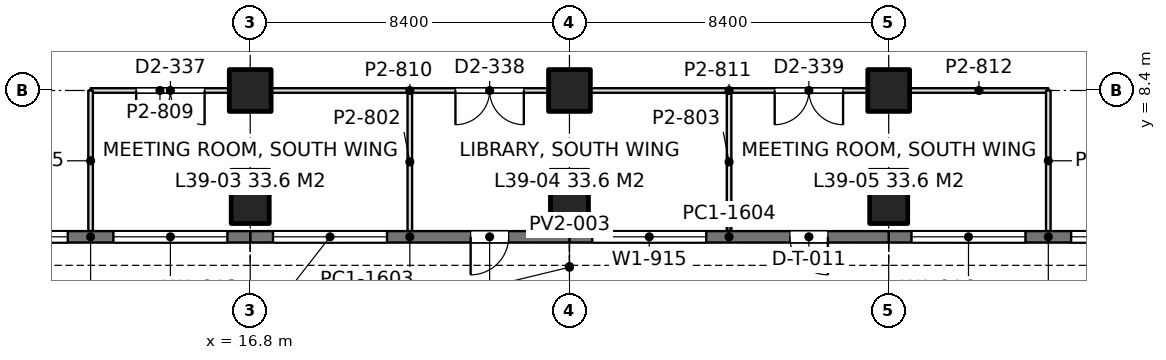
"""IFC4 building model, lengths in metres.
Left out: names, types, materials, properties, quantities, classifications, styles, units other than length and angle.
Written with IfcOpenShell. Run it as: python <this file> out.ifc"""

import sys

from ifc_helpers import new_model, si_unit, direction, frame, frame_2d, origin, origin_2d, place, context, subcontext, project, spatial, rectangle, extrude, element, fill, save


model = new_model("IFC4")
c1 = context("Model", 3, precision=1e-05, world=origin(), true_north=direction((0.0, 1.0)))
c2 = subcontext(c1, "Body", "Model", "MODEL_VIEW")
j1 = project(units=[si_unit("LENGTHUNIT", "METRE"), si_unit("PLANEANGLEUNIT", "RADIAN")], contexts=[c1])
p1 = place(None, origin())
s1 = spatial("IfcSite", under=j1, at=p1, CompositionType="ELEMENT")
p2 = place(p1, origin())
s2 = spatial("IfcBuilding", under=s1, at=p2, CompositionType="ELEMENT")
p3 = place(p2, frame((0.0, 0.0, 173.4)))
s3 = spatial("IfcBuildingStorey", under=s2, at=p3, CompositionType="ELEMENT", Elevation=173.4)
p4 = place(p3, frame((16.8, 5.6, -0.36), z_axis=(0.0, 0.0, 1.0), x_axis=(1.0, 0.0, 0.0)))
e1 = element("IfcColumn", 1, at=p4, inside=s3, PredefinedType="COLUMN", context=c2, shape_type="SweptSolid", body=[
    extrude(rectangle(XDim=1.0, YDim=1.4, at=origin_2d()), origin(), (0.0, 0.0, 1.0), 4.56),
])
p5 = place(p3, frame((16.8, 8.4, 0.0), z_axis=(0.0, 0.0, 1.0), x_axis=(1.0, 0.0, 0.0)))
e2 = element("IfcColumn", 2, at=p5, inside=s3, PredefinedType="COLUMN", context=c2, shape_type="SweptSolid", body=[
    extrude(rectangle(XDim=1.1, YDim=1.1, at=origin_2d()), origin(), (0.0, 0.0, 1.0), 4.2),
])
p6 = place(p3, frame((25.2, 5.6, -0.36), z_axis=(0.0, 0.0, 1.0), x_axis=(1.0, 0.0, 0.0)))
e3 = element("IfcColumn", 3, at=p6, inside=s3, PredefinedType="COLUMN", context=c2, shape_type="SweptSolid", body=[
    extrude(rectangle(XDim=1.0, YDim=1.4, at=origin_2d()), origin(), (0.0, 0.0, 1.0), 4.56),
])
p7 = place(p3, frame((25.2, 8.4, 0.0), z_axis=(0.0, 0.0, 1.0), x_axis=(1.0, 0.0, 0.0)))
e4 = element("IfcColumn", 4, at=p7, inside=s3, PredefinedType="COLUMN", context=c2, shape_type="SweptSolid", body=[
    extrude(rectangle(XDim=1.1, YDim=1.1, at=origin_2d()), origin(), (0.0, 0.0, 1.0), 4.2),
])
p8 = place(p3, frame((33.6, 5.6, -0.36), z_axis=(0.0, 0.0, 1.0), x_axis=(1.0, 0.0, 0.0)))
e5 = element("IfcColumn", 5, at=p8, inside=s3, PredefinedType="COLUMN", context=c2, shape_type="SweptSolid", body=[
    extrude(rectangle(XDim=1.0, YDim=1.4, at=origin_2d()), origin(), (0.0, 0.0, 1.0), 4.56),
])
p9 = place(p3, frame((33.6, 8.4, 0.0), z_axis=(0.0, 0.0, 1.0), x_axis=(1.0, 0.0, 0.0)))
e6 = element("IfcColumn", 6, at=p9, inside=s3, PredefinedType="COLUMN", context=c2, shape_type="SweptSolid", body=[
    extrude(rectangle(XDim=1.1, YDim=1.1, at=origin_2d()), origin(), (0.0, 0.0, 1.0), 4.2),
])
p10 = place(p3, frame((42.0, 4.55, 0.0), z_axis=(0.0, 0.0, 1.0), x_axis=(-1.0, 0.0, 0.0)))
e7 = element("IfcWall", 7, at=p10, inside=s3, PredefinedType="SOLIDWALL", context=c2, shape_type="SweptSolid", body=[
    extrude(rectangle(XDim=8.4, YDim=0.3, at=frame_2d((4.2, 0.0))), origin(), (0.0, 0.0, 1.0), 4.05),
])
p11 = place(p10, frame((0.6, 0.0, 0.9)))
e8 = element("IfcOpeningElement", 8, at=p11, cuts=e7, PredefinedType="OPENING", context=c2, shape_type="SweptSolid", body=[
    extrude(rectangle(XDim=3.0, YDim=1.9, at=frame_2d((1.5, 0.95))), frame((0.0, 0.16, 0.0), z_axis=(0.0, -1.0, 0.0), x_axis=(1.0, 0.0, 0.0)), (0.0, 0.0, 1.0), 0.32),
])
p12 = place(p10, frame((4.8, 0.0, 0.9)))
e9 = element("IfcOpeningElement", 9, at=p12, cuts=e7, PredefinedType="OPENING", context=c2, shape_type="SweptSolid", body=[
    extrude(rectangle(XDim=3.0, YDim=1.9, at=frame_2d((1.5, 0.95))), frame((0.0, 0.16, 0.0), z_axis=(0.0, -1.0, 0.0), x_axis=(1.0, 0.0, 0.0)), (0.0, 0.0, 1.0), 0.32),
])
p13 = place(p3, frame((33.6, 4.55, 0.0), z_axis=(0.0, 0.0, 1.0), x_axis=(-1.0, 0.0, 0.0)))
e10 = element("IfcWall", 10, at=p13, inside=s3, PredefinedType="SOLIDWALL", context=c2, shape_type="SweptSolid", body=[
    extrude(rectangle(XDim=8.4, YDim=0.3, at=frame_2d((4.2, 0.0))), origin(), (0.0, 0.0, 1.0), 4.05),
])
p14 = place(p13, frame((4.8, 0.0, 0.9)))
e11 = element("IfcOpeningElement", 11, at=p14, cuts=e10, PredefinedType="OPENING", context=c2, shape_type="SweptSolid", body=[
    extrude(rectangle(XDim=3.0, YDim=1.9, at=frame_2d((1.5, 0.95))), frame((0.0, 0.16, 0.0), z_axis=(0.0, -1.0, 0.0), x_axis=(1.0, 0.0, 0.0)), (0.0, 0.0, 1.0), 0.32),
])
p15 = place(p13, frame((1.6, 0.0, 0.0)))
e12 = element("IfcOpeningElement", 12, at=p15, cuts=e10, PredefinedType="OPENING", context=c2, shape_type="SweptSolid", body=[
    extrude(rectangle(XDim=1.0, YDim=2.4, at=frame_2d((0.5, 1.2))), frame((0.0, 0.16, 0.0), z_axis=(0.0, -1.0, 0.0), x_axis=(1.0, 0.0, 0.0)), (0.0, 0.0, 1.0), 0.32),
])
p16 = place(p3, frame((25.2, 4.55, 0.0), z_axis=(0.0, 0.0, 1.0), x_axis=(-1.0, 0.0, 0.0)))
e13 = element("IfcWall", 13, at=p16, inside=s3, PredefinedType="SOLIDWALL", context=c2, shape_type="SweptSolid", body=[
    extrude(rectangle(XDim=8.4, YDim=0.3, at=frame_2d((4.2, 0.0))), origin(), (0.0, 0.0, 1.0), 4.05),
])
p17 = place(p16, frame((4.8, 0.0, 0.9)))
e14 = element("IfcOpeningElement", 14, at=p17, cuts=e13, PredefinedType="OPENING", context=c2, shape_type="SweptSolid", body=[
    extrude(rectangle(XDim=3.0, YDim=1.9, at=frame_2d((1.5, 0.95))), frame((0.0, 0.16, 0.0), z_axis=(0.0, -1.0, 0.0), x_axis=(1.0, 0.0, 0.0)), (0.0, 0.0, 1.0), 0.32),
])
p18 = place(p16, frame((1.6, 0.0, 0.0)))
e15 = element("IfcOpeningElement", 15, at=p18, cuts=e13, PredefinedType="OPENING", context=c2, shape_type="SweptSolid", body=[
    extrude(rectangle(XDim=1.0, YDim=2.4, at=frame_2d((0.5, 1.2))), frame((0.0, 0.16, 0.0), z_axis=(0.0, -1.0, 0.0), x_axis=(1.0, 0.0, 0.0)), (0.0, 0.0, 1.0), 0.32),
])
p19 = place(p3, frame((16.8, 4.55, 0.0), z_axis=(0.0, 0.0, 1.0), x_axis=(-1.0, 0.0, 0.0)))
e16 = element("IfcWall", 16, at=p19, inside=s3, PredefinedType="SOLIDWALL", context=c2, shape_type="SweptSolid", body=[
    extrude(rectangle(XDim=8.4, YDim=0.3, at=frame_2d((4.2, 0.0))), origin(), (0.0, 0.0, 1.0), 4.05),
])
p20 = place(p19, frame((0.6, 0.0, 0.9)))
e17 = element("IfcOpeningElement", 17, at=p20, cuts=e16, PredefinedType="OPENING", context=c2, shape_type="SweptSolid", body=[
    extrude(rectangle(XDim=3.0, YDim=1.9, at=frame_2d((1.5, 0.95))), frame((0.0, 0.16, 0.0), z_axis=(0.0, -1.0, 0.0), x_axis=(1.0, 0.0, 0.0)), (0.0, 0.0, 1.0), 0.32),
])
p21 = place(p19, frame((4.8, 0.0, 0.9)))
e18 = element("IfcOpeningElement", 18, at=p21, cuts=e16, PredefinedType="OPENING", context=c2, shape_type="SweptSolid", body=[
    extrude(rectangle(XDim=3.0, YDim=1.9, at=frame_2d((1.5, 0.95))), frame((0.0, 0.16, 0.0), z_axis=(0.0, -1.0, 0.0), x_axis=(1.0, 0.0, 0.0)), (0.0, 0.0, 1.0), 0.32),
])
p22 = place(p3, frame((12.6, 8.4, 0.0), z_axis=(0.0, 0.0, 1.0), x_axis=(1.0, 0.0, 0.0)))
e19 = element("IfcWall", 19, at=p22, inside=s3, PredefinedType="PARTITIONING", context=c2, shape_type="SweptSolid", body=[
    extrude(rectangle(XDim=3.651, YDim=0.12, at=frame_2d((1.825, 0.0))), origin(), (0.0, 0.0, 1.0), 3.55),
])
p23 = place(p22, frame((1.2, 0.0, 0.0)))
e20 = element("IfcOpeningElement", 20, at=p23, cuts=e19, PredefinedType="OPENING", context=c2, shape_type="SweptSolid", body=[
    extrude(rectangle(XDim=1.8, YDim=2.2, at=frame_2d((0.9, 1.1))), frame((0.0, 0.07, 0.0), z_axis=(0.0, -1.0, 0.0), x_axis=(1.0, 0.0, 0.0)), (0.0, 0.0, 1.0), 0.14),
])
p24 = place(p3, frame((17.349, 8.4, 0.0), z_axis=(0.0, 0.0, 1.0), x_axis=(1.0, 0.0, 0.0)))
e21 = element("IfcWall", 21, at=p24, inside=s3, PredefinedType="PARTITIONING", context=c2, shape_type="SweptSolid", body=[
    extrude(rectangle(XDim=7.302, YDim=0.12, at=frame_2d((3.651, 0.0))), origin(), (0.0, 0.0, 1.0), 3.55),
])
p25 = place(p24, frame((4.851, 0.0, 0.0)))
e22 = element("IfcOpeningElement", 22, at=p25, cuts=e21, PredefinedType="OPENING", context=c2, shape_type="SweptSolid", body=[
    extrude(rectangle(XDim=1.8, YDim=2.2, at=frame_2d((0.9, 1.1))), frame((0.0, 0.07, 0.0), z_axis=(0.0, -1.0, 0.0), x_axis=(1.0, 0.0, 0.0)), (0.0, 0.0, 1.0), 0.14),
])
p26 = place(p3, frame((25.749, 8.4, 0.0), z_axis=(0.0, 0.0, 1.0), x_axis=(1.0, 0.0, 0.0)))
e23 = element("IfcWall", 23, at=p26, inside=s3, PredefinedType="PARTITIONING", context=c2, shape_type="SweptSolid", body=[
    extrude(rectangle(XDim=7.302, YDim=0.12, at=frame_2d((3.651, 0.0))), origin(), (0.0, 0.0, 1.0), 3.55),
])
p27 = place(p26, frame((4.851, 0.0, 0.0)))
e24 = element("IfcOpeningElement", 24, at=p27, cuts=e23, PredefinedType="OPENING", context=c2, shape_type="SweptSolid", body=[
    extrude(rectangle(XDim=1.8, YDim=2.2, at=frame_2d((0.9, 1.1))), frame((0.0, 0.07, 0.0), z_axis=(0.0, -1.0, 0.0), x_axis=(1.0, 0.0, 0.0)), (0.0, 0.0, 1.0), 0.14),
])
p28 = place(p3, frame((34.149, 8.4, 0.0), z_axis=(0.0, 0.0, 1.0), x_axis=(1.0, 0.0, 0.0)))
e25 = element("IfcWall", 25, at=p28, inside=s3, PredefinedType="PARTITIONING", context=c2, shape_type="SweptSolid", body=[
    extrude(rectangle(XDim=3.651, YDim=0.12, at=frame_2d((1.826, 0.0))), origin(), (0.0, 0.0, 1.0), 3.55),
])
p29 = place(p3, frame((12.6, 4.7, 0.0), z_axis=(0.0, 0.0, 1.0), x_axis=(0.0, 1.0, 0.0)))
e26 = element("IfcWall", 26, at=p29, inside=s3, PredefinedType="PARTITIONING", context=c2, shape_type="SweptSolid", body=[
    extrude(rectangle(XDim=3.7, YDim=0.12, at=frame_2d((1.85, 0.0))), origin(), (0.0, 0.0, 1.0), 3.55),
])
for number, where, z_axis, x_axis in (
    (27, (21.0, 4.7, 0.0), (0.0, 0.0, 1.0), (0.0, 1.0, 0.0)),
    (28, (29.4, 4.7, 0.0), (0.0, 0.0, 1.0), (0.0, 1.0, 0.0)),
):
    element("IfcWall", number, at=place(p3, frame(where, z_axis=z_axis, x_axis=x_axis)), inside=s3, PredefinedType="PARTITIONING", context=c2, shape_type="SweptSolid", body=[
        extrude(rectangle(XDim=3.642, YDim=0.12, at=frame_2d((1.821, 0.0))), origin(), (0.0, 0.0, 1.0), 3.55),
    ])
p30 = place(p3, frame((37.8, 4.7, 0.0), z_axis=(0.0, 0.0, 1.0), x_axis=(0.0, 1.0, 0.0)))
e29 = element("IfcWall", 29, at=p30, inside=s3, PredefinedType="PARTITIONING", context=c2, shape_type="SweptSolid", body=[
    extrude(rectangle(XDim=3.7, YDim=0.12, at=frame_2d((1.85, 0.0))), origin(), (0.0, 0.0, 1.0), 3.55),
])
p31 = place(p11, origin())
e30 = element("IfcWindow", 30, at=p31, inside=s3, PartitioningType="SINGLE_PANEL", PredefinedType="WINDOW", context=c2, shape_type="SweptSolid", body=[
    extrude(rectangle(XDim=3.0, YDim=1.9, at=frame_2d((1.5, 0.95))), frame((0.0, 0.03, 0.0), z_axis=(0.0, -1.0, 0.0), x_axis=(1.0, 0.0, 0.0)), (0.0, 0.0, 1.0), 0.06),
])
fill(e8, e30)
p32 = place(p12, origin())
e31 = element("IfcWindow", 31, at=p32, inside=s3, PartitioningType="SINGLE_PANEL", PredefinedType="WINDOW", context=c2, shape_type="SweptSolid", body=[
    extrude(rectangle(XDim=3.0, YDim=1.9, at=frame_2d((1.5, 0.95))), frame((0.0, 0.03, 0.0), z_axis=(0.0, -1.0, 0.0), x_axis=(1.0, 0.0, 0.0)), (0.0, 0.0, 1.0), 0.06),
])
fill(e9, e31)
p33 = place(p14, origin())
e32 = element("IfcWindow", 32, at=p33, inside=s3, PartitioningType="SINGLE_PANEL", PredefinedType="WINDOW", context=c2, shape_type="SweptSolid", body=[
    extrude(rectangle(XDim=3.0, YDim=1.9, at=frame_2d((1.5, 0.95))), frame((0.0, 0.03, 0.0), z_axis=(0.0, -1.0, 0.0), x_axis=(1.0, 0.0, 0.0)), (0.0, 0.0, 1.0), 0.06),
])
fill(e11, e32)
p34 = place(p15, origin())
e33 = element("IfcDoor", 33, at=p34, inside=s3, OperationType="SINGLE_SWING_LEFT", PredefinedType="DOOR", context=c2, shape_type="SweptSolid", body=[
    extrude(rectangle(XDim=1.0, YDim=2.4, at=frame_2d((0.5, 1.2))), frame((0.0, 0.025, 0.0), z_axis=(0.0, -1.0, 0.0), x_axis=(1.0, 0.0, 0.0)), (0.0, 0.0, 1.0), 0.05),
])
fill(e12, e33)
p35 = place(p17, origin())
e34 = element("IfcWindow", 34, at=p35, inside=s3, PartitioningType="SINGLE_PANEL", PredefinedType="WINDOW", context=c2, shape_type="SweptSolid", body=[
    extrude(rectangle(XDim=3.0, YDim=1.9, at=frame_2d((1.5, 0.95))), frame((0.0, 0.03, 0.0), z_axis=(0.0, -1.0, 0.0), x_axis=(1.0, 0.0, 0.0)), (0.0, 0.0, 1.0), 0.06),
])
fill(e14, e34)
p36 = place(p18, origin())
e35 = element("IfcDoor", 35, at=p36, inside=s3, OperationType="SINGLE_SWING_RIGHT", PredefinedType="DOOR", context=c2, shape_type="SweptSolid", body=[
    extrude(rectangle(XDim=1.0, YDim=2.4, at=frame_2d((0.5, 1.2))), frame((0.0, 0.025, 0.0), z_axis=(0.0, -1.0, 0.0), x_axis=(1.0, 0.0, 0.0)), (0.0, 0.0, 1.0), 0.05),
])
fill(e15, e35)
p37 = place(p20, origin())
e36 = element("IfcWindow", 36, at=p37, inside=s3, PartitioningType="SINGLE_PANEL", PredefinedType="WINDOW", context=c2, shape_type="SweptSolid", body=[
    extrude(rectangle(XDim=3.0, YDim=1.9, at=frame_2d((1.5, 0.95))), frame((0.0, 0.03, 0.0), z_axis=(0.0, -1.0, 0.0), x_axis=(1.0, 0.0, 0.0)), (0.0, 0.0, 1.0), 0.06),
])
fill(e17, e36)
p38 = place(p21, origin())
e37 = element("IfcWindow", 37, at=p38, inside=s3, PartitioningType="SINGLE_PANEL", PredefinedType="WINDOW", context=c2, shape_type="SweptSolid", body=[
    extrude(rectangle(XDim=3.0, YDim=1.9, at=frame_2d((1.5, 0.95))), frame((0.0, 0.03, 0.0), z_axis=(0.0, -1.0, 0.0), x_axis=(1.0, 0.0, 0.0)), (0.0, 0.0, 1.0), 0.06),
])
fill(e18, e37)
p39 = place(p23, frame((1.8, 0.0, 0.0), z_axis=(0.0, 0.0, 1.0), x_axis=(-1.0, 0.0, 0.0)))
e38 = element("IfcDoor", 38, at=p39, inside=s3, OperationType="DOUBLE_DOOR_SINGLE_SWING", PredefinedType="DOOR", context=c2, shape_type="SweptSolid", body=[
    extrude(rectangle(XDim=1.8, YDim=2.2, at=frame_2d((0.9, 1.1))), frame((0.0, 0.025, 0.0), z_axis=(0.0, -1.0, 0.0), x_axis=(1.0, 0.0, 0.0)), (0.0, 0.0, 1.0), 0.05),
])
fill(e20, e38)
p40 = place(p25, frame((1.8, 0.0, 0.0), z_axis=(0.0, 0.0, 1.0), x_axis=(-1.0, 0.0, 0.0)))
e39 = element("IfcDoor", 39, at=p40, inside=s3, OperationType="DOUBLE_DOOR_SINGLE_SWING", PredefinedType="DOOR", context=c2, shape_type="SweptSolid", body=[
    extrude(rectangle(XDim=1.8, YDim=2.2, at=frame_2d((0.9, 1.1))), frame((0.0, 0.025, 0.0), z_axis=(0.0, -1.0, 0.0), x_axis=(1.0, 0.0, 0.0)), (0.0, 0.0, 1.0), 0.05),
])
fill(e22, e39)
p41 = place(p27, frame((1.8, 0.0, 0.0), z_axis=(0.0, 0.0, 1.0), x_axis=(-1.0, 0.0, 0.0)))
e40 = element("IfcDoor", 40, at=p41, inside=s3, OperationType="DOUBLE_DOOR_SINGLE_SWING", PredefinedType="DOOR", context=c2, shape_type="SweptSolid", body=[
    extrude(rectangle(XDim=1.8, YDim=2.2, at=frame_2d((0.9, 1.1))), frame((0.0, 0.025, 0.0), z_axis=(0.0, -1.0, 0.0), x_axis=(1.0, 0.0, 0.0)), (0.0, 0.0, 1.0), 0.05),
])
fill(e24, e40)
save(model, sys.argv[1])
